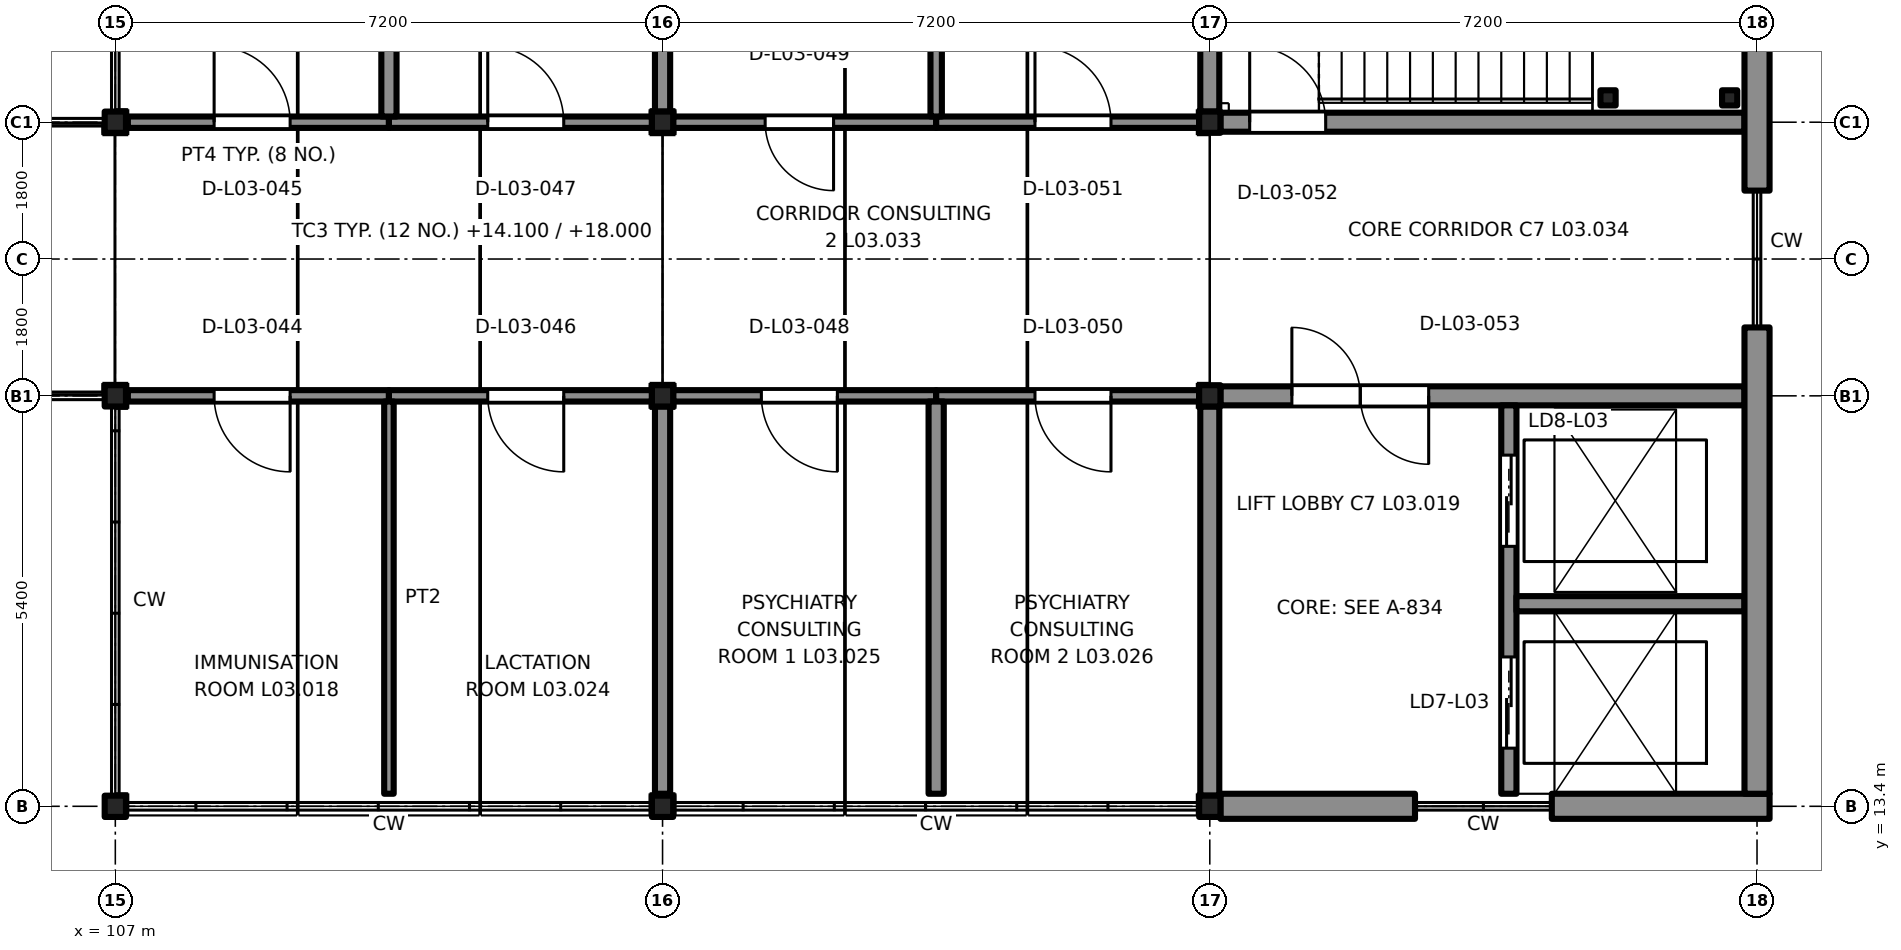
"""IFC4 building model, lengths in metres.
Left out: names, types, materials, properties, quantities, classifications, styles, units other than length and angle.
Written with IfcOpenShell. Run it as: python <this file> out.ifc"""

import sys

from ifc_helpers import new_model, si_unit, direction, frame, frame_2d, origin, origin_2d, place, context, subcontext, project, spatial, rectangle, extrude, element, fill, save


model = new_model("IFC4")
c1 = context("Model", 3, precision=1e-05, world=origin(), true_north=direction((0.0, 1.0)))
c2 = subcontext(c1, "Body", "Model", "MODEL_VIEW")
j1 = project(units=[si_unit("LENGTHUNIT", "METRE"), si_unit("PLANEANGLEUNIT", "RADIAN")], contexts=[c1])
p1 = place(None, origin())
s1 = spatial("IfcSite", under=j1, at=p1, CompositionType="ELEMENT")
p2 = place(p1, origin())
s2 = spatial("IfcBuilding", under=s1, at=p2, CompositionType="ELEMENT")
p3 = place(p2, frame((0.0, 0.0, 14.1)))
s3 = spatial("IfcBuildingStorey", under=s2, at=p3, CompositionType="ELEMENT", Elevation=14.1)
for number, where, z_axis, x_axis in (
    (1, (107.0, 13.4, 0.0), (0.0, 0.0, 1.0), (1.0, 0.0, 0.0)),
    (2, (107.0, 18.8, 0.0), (0.0, 0.0, 1.0), (1.0, 0.0, 0.0)),
    (3, (107.0, 22.4, 0.0), (0.0, 0.0, 1.0), (1.0, 0.0, 0.0)),
    (4, (114.2, 13.4, 0.0), (0.0, 0.0, 1.0), (1.0, 0.0, 0.0)),
    (5, (114.2, 18.8, 0.0), (0.0, 0.0, 1.0), (1.0, 0.0, 0.0)),
    (6, (114.2, 22.4, 0.0), (0.0, 0.0, 1.0), (1.0, 0.0, 0.0)),
    (7, (121.4, 13.4, 0.0), (0.0, 0.0, 1.0), (1.0, 0.0, 0.0)),
    (8, (121.4, 18.8, 0.0), (0.0, 0.0, 1.0), (1.0, 0.0, 0.0)),
    (9, (121.4, 22.4, 0.0), (0.0, 0.0, 1.0), (1.0, 0.0, 0.0)),
):
    element("IfcColumn", number, at=place(p3, frame(where, z_axis=z_axis, x_axis=x_axis)), inside=s3, PredefinedType="COLUMN", context=c2, shape_type="SweptSolid", body=[
        extrude(rectangle(XDim=0.28, YDim=0.28, at=origin_2d()), origin(), (0.0, 0.0, 1.0), 3.9),
    ])
p4 = place(p3, frame((121.54, 22.4, 0.0), z_axis=(0.0, 0.0, 1.0), x_axis=(1.0, 0.0, 0.0)))
e10 = element("IfcWall", 10, at=p4, inside=s3, PredefinedType="SHEAR", context=c2, shape_type="SweptSolid", body=[
    extrude(rectangle(XDim=6.895, YDim=0.25, at=frame_2d((3.448, 0.0))), origin(), (0.0, 0.0, 1.0), 3.2),
])
p5 = place(p4, frame((0.385, 0.0, 0.0)))
e11 = element("IfcOpeningElement", 11, at=p5, cuts=e10, PredefinedType="OPENING", context=c2, shape_type="SweptSolid", body=[
    extrude(rectangle(XDim=1.0, YDim=2.1, at=frame_2d((0.5, 1.05))), frame((0.0, 0.135, 0.0), z_axis=(0.0, -1.0, 0.0), x_axis=(1.0, 0.0, 0.0)), (0.0, 0.0, 1.0), 0.27),
])
p6 = place(p3, frame((121.4, 22.54, 0.0), z_axis=(0.0, 0.0, 1.0), x_axis=(0.0, 1.0, 0.0)))
e12 = element("IfcWall", 12, at=p6, inside=s3, PredefinedType="SHEAR", context=c2, shape_type="SweptSolid", body=[
    extrude(rectangle(XDim=5.12, YDim=0.25, at=frame_2d((2.56, 0.0))), origin(), (0.0, 0.0, 1.0), 3.2),
])
p7 = place(p3, frame((121.54, 18.8, 0.0), z_axis=(0.0, 0.0, 1.0), x_axis=(1.0, 0.0, 0.0)))
e13 = element("IfcWall", 13, at=p7, inside=s3, PredefinedType="SHEAR", context=c2, shape_type="SweptSolid", body=[
    extrude(rectangle(XDim=6.895, YDim=0.25, at=frame_2d((3.448, 0.0))), origin(), (0.0, 0.0, 1.0), 3.2),
])
p8 = place(p7, frame((0.94, 0.0, 0.0)))
e14 = element("IfcOpeningElement", 14, at=p8, cuts=e13, PredefinedType="OPENING", context=c2, shape_type="SweptSolid", body=[
    extrude(rectangle(XDim=1.8, YDim=2.1, at=frame_2d((0.9, 1.05))), frame((0.0, 0.135, 0.0), z_axis=(0.0, -1.0, 0.0), x_axis=(1.0, 0.0, 0.0)), (0.0, 0.0, 1.0), 0.27),
])
p9 = place(p3, frame((121.4, 13.54, 0.0), z_axis=(0.0, 0.0, 1.0), x_axis=(0.0, 1.0, 0.0)))
e15 = element("IfcWall", 15, at=p9, inside=s3, PredefinedType="SHEAR", context=c2, shape_type="SweptSolid", body=[
    extrude(rectangle(XDim=5.12, YDim=0.25, at=frame_2d((2.56, 0.0))), origin(), (0.0, 0.0, 1.0), 3.2),
])
p10 = place(p3, frame((125.335, 13.565, 0.0), z_axis=(0.0, 0.0, 1.0), x_axis=(0.0, 1.0, 0.0)))
e16 = element("IfcWall", 16, at=p10, inside=s3, PredefinedType="SHEAR", context=c2, shape_type="SweptSolid", body=[
    extrude(rectangle(XDim=5.11, YDim=0.2, at=frame_2d((2.555, 0.0))), origin(), (0.0, 0.0, 1.0), 3.2),
])
p11 = place(p10, frame((0.6, 0.0, 0.0)))
e17 = element("IfcOpeningElement", 17, at=p11, cuts=e16, PredefinedType="OPENING", context=c2, shape_type="SweptSolid", body=[
    extrude(rectangle(XDim=1.2, YDim=2.1, at=frame_2d((0.6, 1.05))), frame((0.0, 0.11, 0.0), z_axis=(0.0, -1.0, 0.0), x_axis=(1.0, 0.0, 0.0)), (0.0, 0.0, 1.0), 0.22),
])
p12 = place(p10, frame((3.255, 0.0, 0.0)))
e18 = element("IfcOpeningElement", 18, at=p12, cuts=e16, PredefinedType="OPENING", context=c2, shape_type="SweptSolid", body=[
    extrude(rectangle(XDim=1.2, YDim=2.1, at=frame_2d((0.6, 1.05))), frame((0.0, 0.11, 0.0), z_axis=(0.0, -1.0, 0.0), x_axis=(1.0, 0.0, 0.0)), (0.0, 0.0, 1.0), 0.22),
])
p13 = place(p3, frame((128.435, 16.065, 0.0), z_axis=(0.0, 0.0, 1.0), x_axis=(-1.0, 0.0, 0.0)))
e19 = element("IfcWall", 19, at=p13, inside=s3, PredefinedType="SHEAR", context=c2, shape_type="SweptSolid", body=[
    extrude(rectangle(XDim=3.0, YDim=0.2, at=frame_2d((1.5, 0.0))), origin(), (0.0, 0.0, 1.0), 3.2),
])
for number, where, z_axis, x_axis in (
    (20, (128.24, 22.72, 0.0), (0.0, 0.0, 1.0), (1.0, 0.0, 0.0)),
    (21, (126.64, 22.72, 0.0), (0.0, 0.0, 1.0), (1.0, 0.0, 0.0)),
):
    element("IfcColumn", number, at=place(p3, frame(where, z_axis=z_axis, x_axis=x_axis)), inside=s3, PredefinedType="COLUMN", context=c2, shape_type="SweptSolid", body=[
        extrude(rectangle(XDim=0.2, YDim=0.2, at=origin_2d()), origin(), (0.0, 0.0, 1.0), 1.75),
    ])
p14 = place(p3, frame((124.1, 13.4, 0.0), z_axis=(0.0, 0.0, 1.0), x_axis=(-1.0, 0.0, 0.0)))
e22 = element("IfcWall", 22, at=p14, inside=s3, PredefinedType="SOLIDWALL", context=c2, shape_type="SweptSolid", body=[
    extrude(rectangle(XDim=2.56, YDim=0.33, at=frame_2d((1.28, 0.0))), origin(), (0.0, 0.0, 1.0), 3.2),
])
p15 = place(p3, frame((128.765, 13.4, 0.0), z_axis=(0.0, 0.0, 1.0), x_axis=(-1.0, 0.0, 0.0)))
e23 = element("IfcWall", 23, at=p15, inside=s3, PredefinedType="SOLIDWALL", context=c2, shape_type="SweptSolid", body=[
    extrude(rectangle(XDim=2.865, YDim=0.33, at=frame_2d((1.433, 0.0))), origin(), (0.0, 0.0, 1.0), 3.2),
])
p16 = place(p3, frame((128.6, 19.7, 0.0), z_axis=(0.0, 0.0, 1.0), x_axis=(0.0, -1.0, 0.0)))
e24 = element("IfcWall", 24, at=p16, inside=s3, PredefinedType="SOLIDWALL", context=c2, shape_type="SweptSolid", body=[
    extrude(rectangle(XDim=6.135, YDim=0.33, at=frame_2d((3.067, 0.0))), origin(), (0.0, 0.0, 1.0), 3.2),
])
p17 = place(p3, frame((128.6, 24.48, 0.0), z_axis=(0.0, 0.0, 1.0), x_axis=(0.0, -1.0, 0.0)))
e25 = element("IfcWall", 25, at=p17, inside=s3, PredefinedType="SOLIDWALL", context=c2, shape_type="SweptSolid", body=[
    extrude(rectangle(XDim=2.98, YDim=0.33, at=frame_2d((1.49, 0.0))), origin(), (0.0, 0.0, 1.0), 3.2),
])
p18 = place(p3, frame((110.6, 18.8, 0.0), z_axis=(0.0, 0.0, 1.0), x_axis=(-1.0, 0.0, 0.0)))
e26 = element("IfcWall", 26, at=p18, inside=s3, PredefinedType="PARTITIONING", context=c2, shape_type="SweptSolid", body=[
    extrude(rectangle(XDim=3.435, YDim=0.15, at=frame_2d((1.718, 0.0))), origin(), (0.0, 0.0, 1.0), 5.331),
])
p19 = place(p18, frame((1.3, 0.0, 0.0)))
e27 = element("IfcOpeningElement", 27, at=p19, cuts=e26, PredefinedType="OPENING", context=c2, shape_type="SweptSolid", body=[
    extrude(rectangle(XDim=1.0, YDim=2.1, at=frame_2d((0.5, 1.05))), frame((0.0, 0.085, 0.0), z_axis=(0.0, -1.0, 0.0), x_axis=(1.0, 0.0, 0.0)), (0.0, 0.0, 1.0), 0.17),
])
p20 = place(p3, frame((114.06, 18.8, 0.0), z_axis=(0.0, 0.0, 1.0), x_axis=(-1.0, 0.0, 0.0)))
e28 = element("IfcWall", 28, at=p20, inside=s3, PredefinedType="PARTITIONING", context=c2, shape_type="SweptSolid", body=[
    extrude(rectangle(XDim=3.46, YDim=0.15, at=frame_2d((1.73, 0.0))), origin(), (0.0, 0.0, 1.0), 5.331),
])
p21 = place(p20, frame((1.16, 0.0, 0.0)))
e29 = element("IfcOpeningElement", 29, at=p21, cuts=e28, PredefinedType="OPENING", context=c2, shape_type="SweptSolid", body=[
    extrude(rectangle(XDim=1.0, YDim=2.1, at=frame_2d((0.5, 1.05))), frame((0.0, 0.085, 0.0), z_axis=(0.0, -1.0, 0.0), x_axis=(1.0, 0.0, 0.0)), (0.0, 0.0, 1.0), 0.17),
])
p22 = place(p3, frame((110.6, 13.565, 0.0), z_axis=(0.0, 0.0, 1.0), x_axis=(0.0, 1.0, 0.0)))
e30 = element("IfcWall", 30, at=p22, inside=s3, PredefinedType="PARTITIONING", context=c2, shape_type="SweptSolid", body=[
    extrude(rectangle(XDim=5.16, YDim=0.125, at=frame_2d((2.58, 0.0))), origin(), (0.0, 0.0, 1.0), 5.331),
])
p23 = place(p3, frame((117.8, 18.8, 0.0), z_axis=(0.0, 0.0, 1.0), x_axis=(-1.0, 0.0, 0.0)))
e31 = element("IfcWall", 31, at=p23, inside=s3, PredefinedType="PARTITIONING", context=c2, shape_type="SweptSolid", body=[
    extrude(rectangle(XDim=3.46, YDim=0.15, at=frame_2d((1.73, 0.0))), origin(), (0.0, 0.0, 1.0), 5.331),
])
p24 = place(p23, frame((1.3, 0.0, 0.0)))
e32 = element("IfcOpeningElement", 32, at=p24, cuts=e31, PredefinedType="OPENING", context=c2, shape_type="SweptSolid", body=[
    extrude(rectangle(XDim=1.0, YDim=2.1, at=frame_2d((0.5, 1.05))), frame((0.0, 0.085, 0.0), z_axis=(0.0, -1.0, 0.0), x_axis=(1.0, 0.0, 0.0)), (0.0, 0.0, 1.0), 0.17),
])
p25 = place(p3, frame((114.2, 13.565, 0.0), z_axis=(0.0, 0.0, 1.0), x_axis=(0.0, 1.0, 0.0)))
e33 = element("IfcWall", 33, at=p25, inside=s3, PredefinedType="PARTITIONING", context=c2, shape_type="SweptSolid", body=[
    extrude(rectangle(XDim=5.095, YDim=0.2, at=frame_2d((2.547, 0.0))), origin(), (0.0, 0.0, 1.0), 3.9),
])
p26 = place(p3, frame((121.26, 18.8, 0.0), z_axis=(0.0, 0.0, 1.0), x_axis=(-1.0, 0.0, 0.0)))
e34 = element("IfcWall", 34, at=p26, inside=s3, PredefinedType="PARTITIONING", context=c2, shape_type="SweptSolid", body=[
    extrude(rectangle(XDim=3.46, YDim=0.15, at=frame_2d((1.73, 0.0))), origin(), (0.0, 0.0, 1.0), 5.331),
])
p27 = place(p26, frame((1.16, 0.0, 0.0)))
e35 = element("IfcOpeningElement", 35, at=p27, cuts=e34, PredefinedType="OPENING", context=c2, shape_type="SweptSolid", body=[
    extrude(rectangle(XDim=1.0, YDim=2.1, at=frame_2d((0.5, 1.05))), frame((0.0, 0.085, 0.0), z_axis=(0.0, -1.0, 0.0), x_axis=(1.0, 0.0, 0.0)), (0.0, 0.0, 1.0), 0.17),
])
p28 = place(p3, frame((117.8, 13.565, 0.0), z_axis=(0.0, 0.0, 1.0), x_axis=(0.0, 1.0, 0.0)))
e36 = element("IfcWall", 36, at=p28, inside=s3, PredefinedType="PARTITIONING", context=c2, shape_type="SweptSolid", body=[
    extrude(rectangle(XDim=5.16, YDim=0.2, at=frame_2d((2.58, 0.0))), origin(), (0.0, 0.0, 1.0), 5.331),
])
p29 = place(p3, frame((107.165, 22.4, 0.0), z_axis=(0.0, 0.0, 1.0), x_axis=(1.0, 0.0, 0.0)))
e37 = element("IfcWall", 37, at=p29, inside=s3, PredefinedType="PARTITIONING", context=c2, shape_type="SweptSolid", body=[
    extrude(rectangle(XDim=3.435, YDim=0.15, at=frame_2d((1.718, 0.0))), origin(), (0.0, 0.0, 1.0), 5.331),
])
p30 = place(p29, frame((1.135, 0.0, 0.0)))
e38 = element("IfcOpeningElement", 38, at=p30, cuts=e37, PredefinedType="OPENING", context=c2, shape_type="SweptSolid", body=[
    extrude(rectangle(XDim=1.0, YDim=2.1, at=frame_2d((0.5, 1.05))), frame((0.0, 0.085, 0.0), z_axis=(0.0, -1.0, 0.0), x_axis=(1.0, 0.0, 0.0)), (0.0, 0.0, 1.0), 0.17),
])
p31 = place(p3, frame((110.6, 22.4, 0.0), z_axis=(0.0, 0.0, 1.0), x_axis=(1.0, 0.0, 0.0)))
e39 = element("IfcWall", 39, at=p31, inside=s3, PredefinedType="PARTITIONING", context=c2, shape_type="SweptSolid", body=[
    extrude(rectangle(XDim=3.46, YDim=0.15, at=frame_2d((1.73, 0.0))), origin(), (0.0, 0.0, 1.0), 5.331),
])
p32 = place(p31, frame((1.3, 0.0, 0.0)))
e40 = element("IfcOpeningElement", 40, at=p32, cuts=e39, PredefinedType="OPENING", context=c2, shape_type="SweptSolid", body=[
    extrude(rectangle(XDim=1.0, YDim=2.1, at=frame_2d((0.5, 1.05))), frame((0.0, 0.085, 0.0), z_axis=(0.0, -1.0, 0.0), x_axis=(1.0, 0.0, 0.0)), (0.0, 0.0, 1.0), 0.17),
])
p33 = place(p3, frame((110.6, 27.635, 0.0), z_axis=(0.0, 0.0, 1.0), x_axis=(0.0, -1.0, 0.0)))
e41 = element("IfcWall", 41, at=p33, inside=s3, PredefinedType="PARTITIONING", context=c2, shape_type="SweptSolid", body=[
    extrude(rectangle(XDim=5.16, YDim=0.2, at=frame_2d((2.58, 0.0))), origin(), (0.0, 0.0, 1.0), 5.331),
])
p34 = place(p3, frame((117.8, 22.4, 0.0), z_axis=(0.0, 0.0, 1.0), x_axis=(-1.0, 0.0, 0.0)))
e42 = element("IfcWall", 42, at=p34, inside=s3, PredefinedType="PARTITIONING", context=c2, shape_type="SweptSolid", body=[
    extrude(rectangle(XDim=3.46, YDim=0.15, at=frame_2d((1.73, 0.0))), origin(), (0.0, 0.0, 1.0), 5.331),
])
p35 = place(p34, frame((1.35, 0.0, 0.0)))
e43 = element("IfcOpeningElement", 43, at=p35, cuts=e42, PredefinedType="OPENING", context=c2, shape_type="SweptSolid", body=[
    extrude(rectangle(XDim=0.9, YDim=2.1, at=frame_2d((0.45, 1.05))), frame((0.0, 0.085, 0.0), z_axis=(0.0, -1.0, 0.0), x_axis=(1.0, 0.0, 0.0)), (0.0, 0.0, 1.0), 0.17),
])
p36 = place(p3, frame((114.2, 27.635, 0.0), z_axis=(0.0, 0.0, 1.0), x_axis=(0.0, -1.0, 0.0)))
e44 = element("IfcWall", 44, at=p36, inside=s3, PredefinedType="PARTITIONING", context=c2, shape_type="SweptSolid", body=[
    extrude(rectangle(XDim=5.095, YDim=0.2, at=frame_2d((2.547, 0.0))), origin(), (0.0, 0.0, 1.0), 3.9),
])
p37 = place(p3, frame((117.8, 22.4, 0.0), z_axis=(0.0, 0.0, 1.0), x_axis=(1.0, 0.0, 0.0)))
e45 = element("IfcWall", 45, at=p37, inside=s3, PredefinedType="PARTITIONING", context=c2, shape_type="SweptSolid", body=[
    extrude(rectangle(XDim=3.46, YDim=0.15, at=frame_2d((1.73, 0.0))), origin(), (0.0, 0.0, 1.0), 5.331),
])
p38 = place(p37, frame((1.3, 0.0, 0.0)))
e46 = element("IfcOpeningElement", 46, at=p38, cuts=e45, PredefinedType="OPENING", context=c2, shape_type="SweptSolid", body=[
    extrude(rectangle(XDim=1.0, YDim=2.1, at=frame_2d((0.5, 1.05))), frame((0.0, 0.085, 0.0), z_axis=(0.0, -1.0, 0.0), x_axis=(1.0, 0.0, 0.0)), (0.0, 0.0, 1.0), 0.17),
])
p39 = place(p3, frame((117.8, 27.635, 0.0), z_axis=(0.0, 0.0, 1.0), x_axis=(0.0, -1.0, 0.0)))
e47 = element("IfcWall", 47, at=p39, inside=s3, PredefinedType="PARTITIONING", context=c2, shape_type="SweptSolid", body=[
    extrude(rectangle(XDim=5.16, YDim=0.15, at=frame_2d((2.58, 0.0))), origin(), (0.0, 0.0, 1.0), 5.331),
])
p40 = place(p5, origin())
e48 = element("IfcDoor", 48, at=p40, inside=s3, OperationType="SINGLE_SWING_RIGHT", PredefinedType="DOOR", context=c2, shape_type="SweptSolid", body=[
    extrude(rectangle(XDim=1.0, YDim=2.1, at=frame_2d((0.5, 1.05))), frame((0.0, 0.025, 0.0), z_axis=(0.0, -1.0, 0.0), x_axis=(1.0, 0.0, 0.0)), (0.0, 0.0, 1.0), 0.05),
])
fill(e11, e48)
p41 = place(p8, origin())
e49 = element("IfcDoor", 49, at=p41, inside=s3, OperationType="DOUBLE_DOOR_SINGLE_SWING", PredefinedType="DOOR", context=c2, shape_type="SweptSolid", body=[
    extrude(rectangle(XDim=1.8, YDim=2.1, at=frame_2d((0.9, 1.05))), frame((0.0, 0.025, 0.0), z_axis=(0.0, -1.0, 0.0), x_axis=(1.0, 0.0, 0.0)), (0.0, 0.0, 1.0), 0.05),
])
fill(e14, e49)
p42 = place(p11, origin())
e50 = element("IfcDoor", 50, at=p42, inside=s3, OperationType="DOUBLE_DOOR_SLIDING", PredefinedType="DOOR", context=c2, shape_type="SweptSolid", body=[
    extrude(rectangle(XDim=1.2, YDim=2.1, at=frame_2d((0.6, 1.05))), frame((0.0, 0.025, 0.0), z_axis=(0.0, -1.0, 0.0), x_axis=(1.0, 0.0, 0.0)), (0.0, 0.0, 1.0), 0.05),
])
fill(e17, e50)
p43 = place(p12, origin())
e51 = element("IfcDoor", 51, at=p43, inside=s3, OperationType="DOUBLE_DOOR_SLIDING", PredefinedType="DOOR", context=c2, shape_type="SweptSolid", body=[
    extrude(rectangle(XDim=1.2, YDim=2.1, at=frame_2d((0.6, 1.05))), frame((0.0, 0.025, 0.0), z_axis=(0.0, -1.0, 0.0), x_axis=(1.0, 0.0, 0.0)), (0.0, 0.0, 1.0), 0.05),
])
fill(e18, e51)
p44 = place(p19, origin())
e52 = element("IfcDoor", 52, at=p44, inside=s3, OperationType="SINGLE_SWING_RIGHT", PredefinedType="DOOR", context=c2, shape_type="SweptSolid", body=[
    extrude(rectangle(XDim=1.0, YDim=2.1, at=frame_2d((0.5, 1.05))), frame((0.0, 0.025, 0.0), z_axis=(0.0, -1.0, 0.0), x_axis=(1.0, 0.0, 0.0)), (0.0, 0.0, 1.0), 0.05),
])
fill(e27, e52)
p45 = place(p21, origin())
e53 = element("IfcDoor", 53, at=p45, inside=s3, OperationType="SINGLE_SWING_LEFT", PredefinedType="DOOR", context=c2, shape_type="SweptSolid", body=[
    extrude(rectangle(XDim=1.0, YDim=2.1, at=frame_2d((0.5, 1.05))), frame((0.0, 0.025, 0.0), z_axis=(0.0, -1.0, 0.0), x_axis=(1.0, 0.0, 0.0)), (0.0, 0.0, 1.0), 0.05),
])
fill(e29, e53)
p46 = place(p24, origin())
e54 = element("IfcDoor", 54, at=p46, inside=s3, OperationType="SINGLE_SWING_RIGHT", PredefinedType="DOOR", context=c2, shape_type="SweptSolid", body=[
    extrude(rectangle(XDim=1.0, YDim=2.1, at=frame_2d((0.5, 1.05))), frame((0.0, 0.025, 0.0), z_axis=(0.0, -1.0, 0.0), x_axis=(1.0, 0.0, 0.0)), (0.0, 0.0, 1.0), 0.05),
])
fill(e32, e54)
p47 = place(p27, origin())
e55 = element("IfcDoor", 55, at=p47, inside=s3, OperationType="SINGLE_SWING_LEFT", PredefinedType="DOOR", context=c2, shape_type="SweptSolid", body=[
    extrude(rectangle(XDim=1.0, YDim=2.1, at=frame_2d((0.5, 1.05))), frame((0.0, 0.025, 0.0), z_axis=(0.0, -1.0, 0.0), x_axis=(1.0, 0.0, 0.0)), (0.0, 0.0, 1.0), 0.05),
])
fill(e35, e55)
p48 = place(p30, origin())
e56 = element("IfcDoor", 56, at=p48, inside=s3, OperationType="SINGLE_SWING_LEFT", PredefinedType="DOOR", context=c2, shape_type="SweptSolid", body=[
    extrude(rectangle(XDim=1.0, YDim=2.1, at=frame_2d((0.5, 1.05))), frame((0.0, 0.025, 0.0), z_axis=(0.0, -1.0, 0.0), x_axis=(1.0, 0.0, 0.0)), (0.0, 0.0, 1.0), 0.05),
])
fill(e38, e56)
p49 = place(p32, origin())
e57 = element("IfcDoor", 57, at=p49, inside=s3, OperationType="SINGLE_SWING_RIGHT", PredefinedType="DOOR", context=c2, shape_type="SweptSolid", body=[
    extrude(rectangle(XDim=1.0, YDim=2.1, at=frame_2d((0.5, 1.05))), frame((0.0, 0.025, 0.0), z_axis=(0.0, -1.0, 0.0), x_axis=(1.0, 0.0, 0.0)), (0.0, 0.0, 1.0), 0.05),
])
fill(e40, e57)
p50 = place(p35, origin())
e58 = element("IfcDoor", 58, at=p50, inside=s3, OperationType="SINGLE_SWING_RIGHT", PredefinedType="DOOR", context=c2, shape_type="SweptSolid", body=[
    extrude(rectangle(XDim=0.9, YDim=2.1, at=frame_2d((0.45, 1.05))), frame((0.0, 0.025, 0.0), z_axis=(0.0, -1.0, 0.0), x_axis=(1.0, 0.0, 0.0)), (0.0, 0.0, 1.0), 0.05),
])
fill(e43, e58)
p51 = place(p38, origin())
e59 = element("IfcDoor", 59, at=p51, inside=s3, OperationType="SINGLE_SWING_RIGHT", PredefinedType="DOOR", context=c2, shape_type="SweptSolid", body=[
    extrude(rectangle(XDim=1.0, YDim=2.1, at=frame_2d((0.5, 1.05))), frame((0.0, 0.025, 0.0), z_axis=(0.0, -1.0, 0.0), x_axis=(1.0, 0.0, 0.0)), (0.0, 0.0, 1.0), 0.05),
])
fill(e46, e59)
save(model, sys.argv[1])
